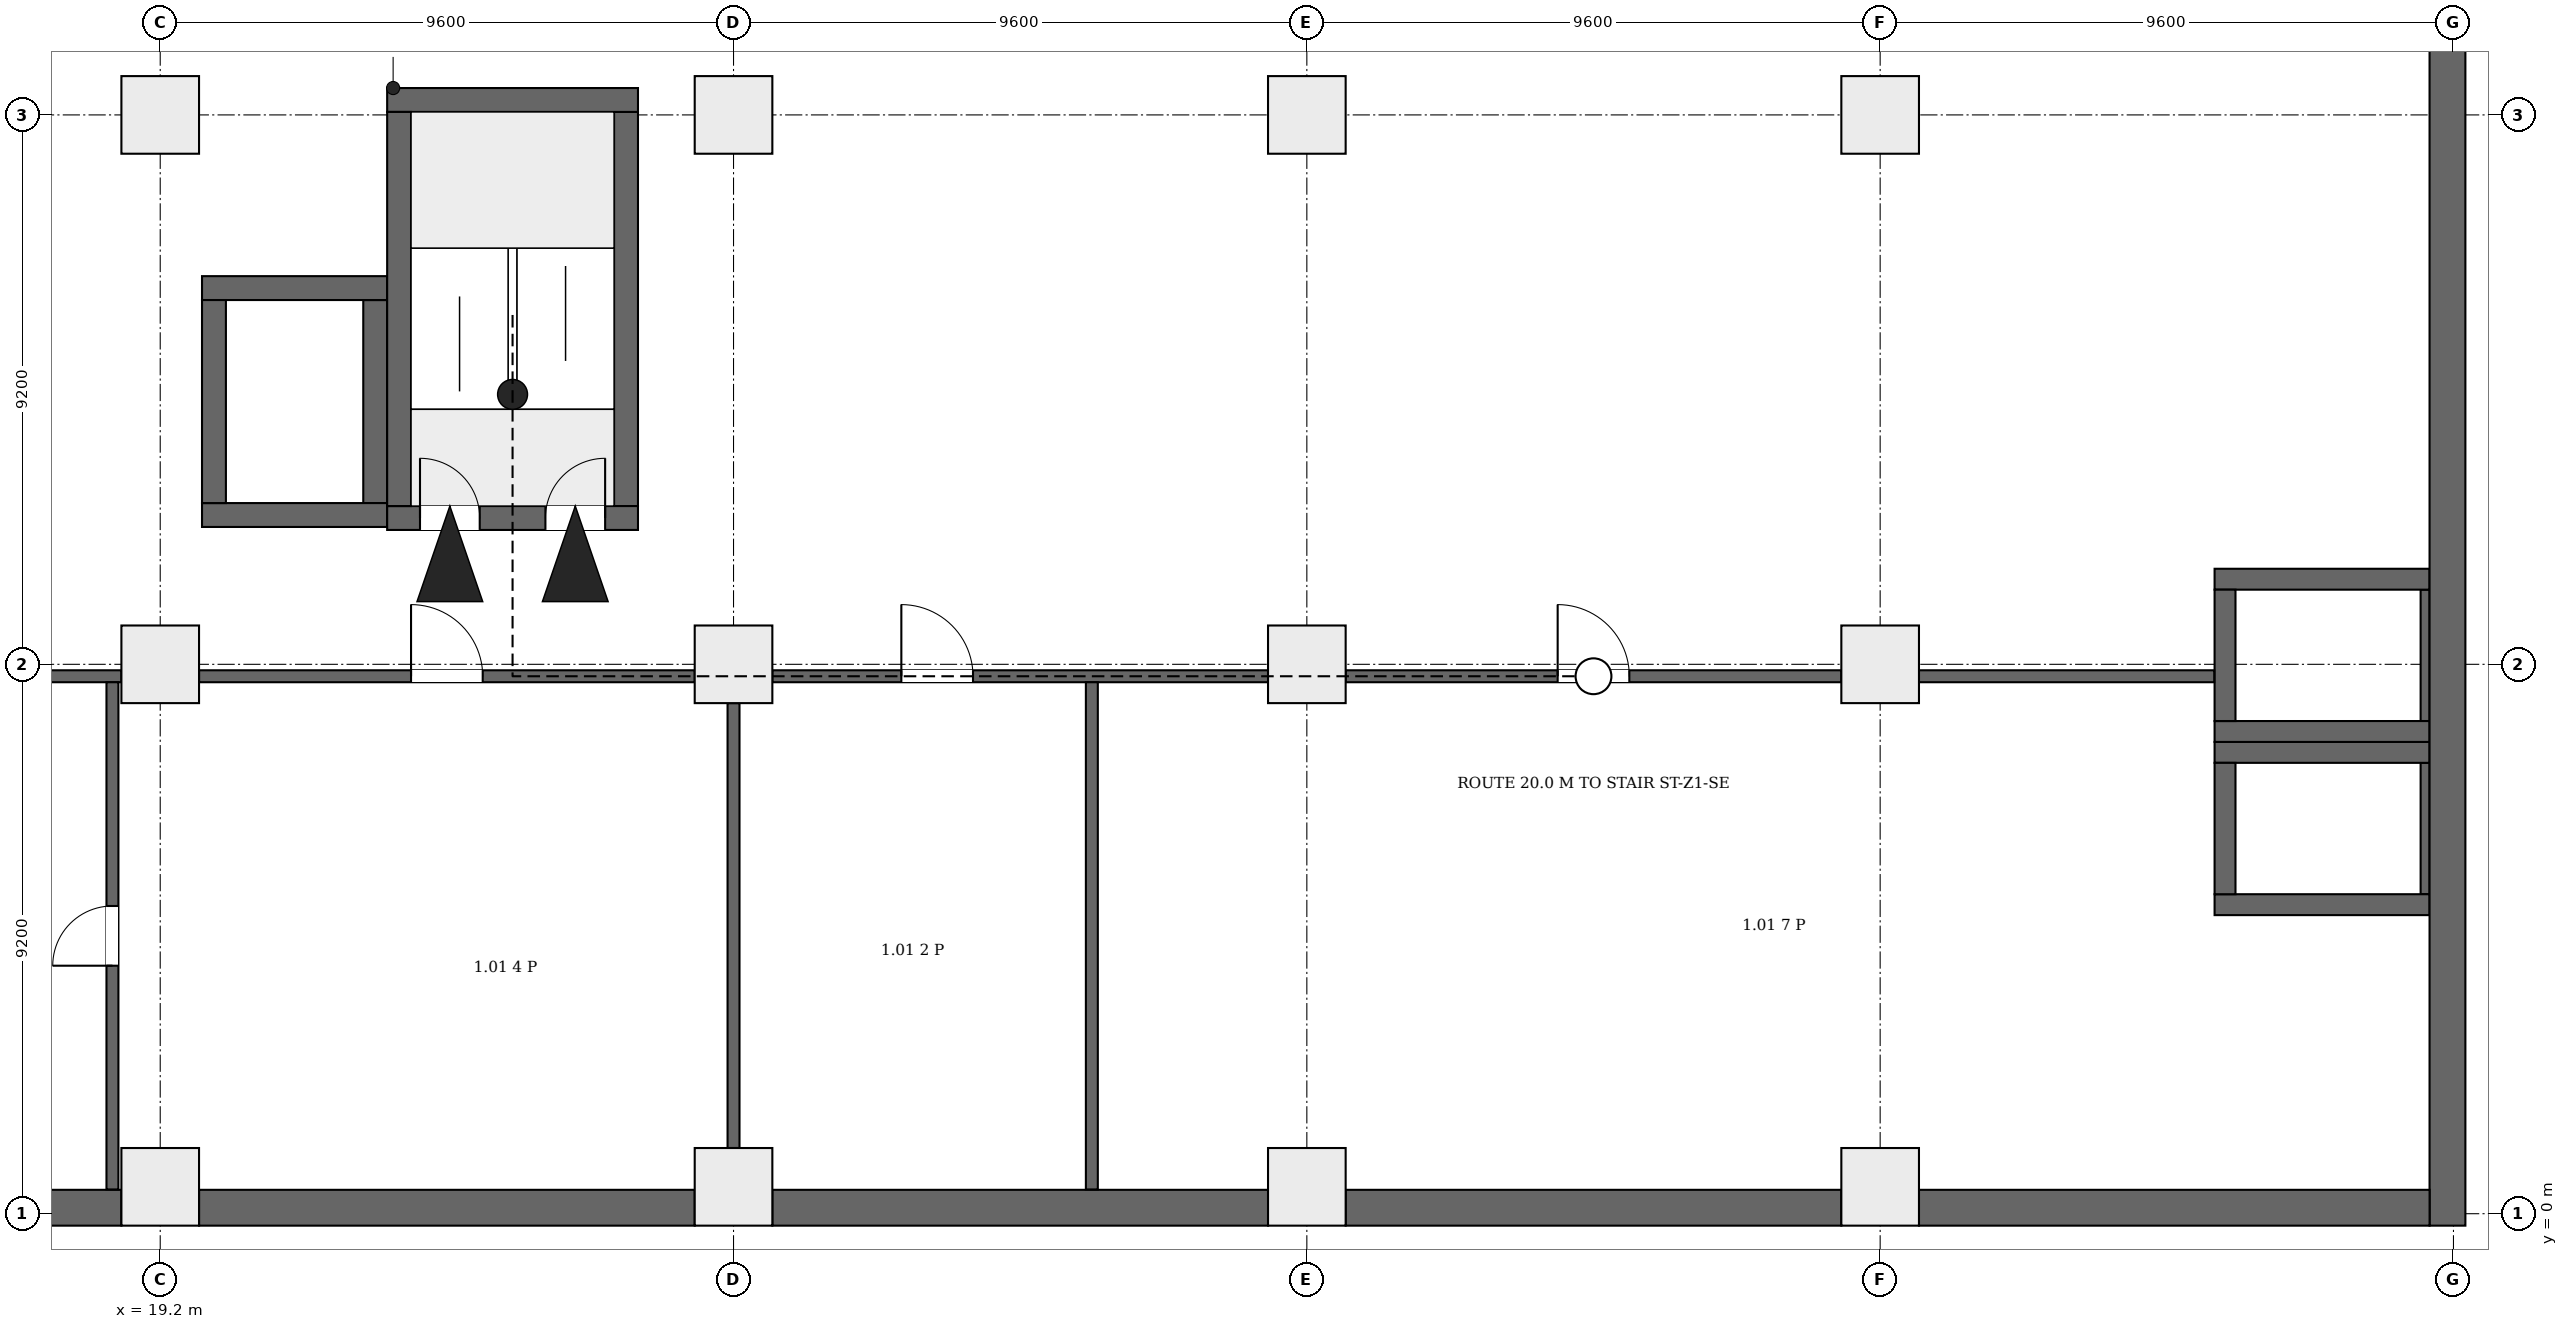
"""IFC4 building model, lengths in metres.
Left out: names, types, materials, properties, quantities, classifications, styles, units other than length and angle.
Written with IfcOpenShell. Run it as: python <this file> out.ifc"""

import sys

from ifc_helpers import new_model, si_unit, direction, frame, frame_2d, origin, origin_2d, place, context, subcontext, project, spatial, rectangle, extrude, element, fill, save


model = new_model("IFC4")
c1 = context("Model", 3, precision=1e-05, world=origin(), true_north=direction((0.0, 1.0)))
c2 = subcontext(c1, "Body", "Model", "MODEL_VIEW")
j1 = project(units=[si_unit("LENGTHUNIT", "METRE"), si_unit("PLANEANGLEUNIT", "RADIAN")], contexts=[c1])
p1 = place(None, origin())
s1 = spatial("IfcSite", under=j1, at=p1, CompositionType="ELEMENT")
p2 = place(p1, origin())
s2 = spatial("IfcBuilding", under=s1, at=p2, CompositionType="ELEMENT")
p3 = place(p2, frame((0.0, 0.0, -5.5)))
s3 = spatial("IfcBuildingStorey", under=s2, at=p3, CompositionType="ELEMENT", Elevation=-5.5)
p4 = place(p3, frame((57.5, -0.2, 0.0), z_axis=(0.0, 0.0, 1.0), x_axis=(0.0, 1.0, 0.0)))
e1 = element("IfcWall", 1, at=p4, inside=s3, PredefinedType="SOLIDWALL", context=c2, shape_type="SweptSolid", body=[
    extrude(rectangle(XDim=46.88, YDim=0.6, at=frame_2d((23.44, 0.0))), origin(), (0.0, 0.0, 1.0), 5.5),
])
p5 = place(p3, frame((10.25, 0.1, 0.0), z_axis=(0.0, 0.0, 1.0), x_axis=(1.0, 0.0, 0.0)))
e2 = element("IfcWall", 2, at=p5, inside=s3, PredefinedType="SOLIDWALL", context=c2, shape_type="SweptSolid", body=[
    extrude(rectangle(XDim=8.3, YDim=0.6, at=frame_2d((4.15, 0.0))), origin(), (0.0, 0.0, 1.0), 5.5),
])
p6 = place(p3, frame((19.85, 0.1, 0.0), z_axis=(0.0, 0.0, 1.0), x_axis=(1.0, 0.0, 0.0)))
e3 = element("IfcWall", 3, at=p6, inside=s3, PredefinedType="SOLIDWALL", context=c2, shape_type="SweptSolid", body=[
    extrude(rectangle(XDim=8.3, YDim=0.6, at=frame_2d((4.15, 0.0))), origin(), (0.0, 0.0, 1.0), 5.5),
])
for number, where, z_axis, x_axis in (
    (4, (29.45, 0.1, 0.0), (0.0, 0.0, 1.0), (1.0, 0.0, 0.0)),
    (5, (39.05, 0.1, 0.0), (0.0, 0.0, 1.0), (1.0, 0.0, 0.0)),
):
    element("IfcWall", number, at=place(p3, frame(where, z_axis=z_axis, x_axis=x_axis)), inside=s3, PredefinedType="SOLIDWALL", context=c2, shape_type="SweptSolid", body=[
        extrude(rectangle(XDim=8.3, YDim=0.6, at=frame_2d((4.15, 0.0))), origin(), (0.0, 0.0, 1.0), 5.5),
    ])
p7 = place(p3, frame((48.65, 0.1, 0.0), z_axis=(0.0, 0.0, 1.0), x_axis=(1.0, 0.0, 0.0)))
e6 = element("IfcWall", 6, at=p7, inside=s3, PredefinedType="SOLIDWALL", context=c2, shape_type="SweptSolid", body=[
    extrude(rectangle(XDim=8.55, YDim=0.6, at=frame_2d((4.275, 0.0))), origin(), (0.0, 0.0, 1.0), 5.5),
])
p8 = place(p3, frame((23.0, 11.65, 0.0), z_axis=(0.0, 0.0, 1.0), x_axis=(1.0, 0.0, 0.0)))
e7 = element("IfcWall", 7, at=p8, inside=s3, PredefinedType="SHEAR", context=c2, shape_type="SweptSolid", body=[
    extrude(rectangle(XDim=4.2, YDim=0.4, at=frame_2d((2.1, 0.0))), origin(), (0.0, 0.0, 1.0), 5.5),
])
p9 = place(p8, frame((0.55, 0.0, 0.0)))
e8 = element("IfcOpeningElement", 8, at=p9, cuts=e7, PredefinedType="OPENING", context=c2, shape_type="SweptSolid", body=[
    extrude(rectangle(XDim=1.0, YDim=2.1, at=frame_2d((0.5, 1.05))), frame((0.0, 0.21, 0.0), z_axis=(0.0, -1.0, 0.0), x_axis=(1.0, 0.0, 0.0)), (0.0, 0.0, 1.0), 0.42),
])
p10 = place(p8, frame((2.65, 0.0, 0.0)))
e9 = element("IfcOpeningElement", 9, at=p10, cuts=e7, PredefinedType="OPENING", context=c2, shape_type="SweptSolid", body=[
    extrude(rectangle(XDim=1.0, YDim=2.1, at=frame_2d((0.5, 1.05))), frame((0.0, 0.21, 0.0), z_axis=(0.0, -1.0, 0.0), x_axis=(1.0, 0.0, 0.0)), (0.0, 0.0, 1.0), 0.42),
])
p11 = place(p3, frame((23.0, 18.65, 0.0), z_axis=(0.0, 0.0, 1.0), x_axis=(1.0, 0.0, 0.0)))
e10 = element("IfcWall", 10, at=p11, inside=s3, PredefinedType="SHEAR", context=c2, shape_type="SweptSolid", body=[
    extrude(rectangle(XDim=4.2, YDim=0.4, at=frame_2d((2.1, 0.0))), origin(), (0.0, 0.0, 1.0), 5.5),
])
for number, where, z_axis, x_axis in (
    (11, (23.2, 11.85, 0.0), (0.0, 0.0, 1.0), (0.0, 1.0, 0.0)),
    (12, (27.0, 11.85, 0.0), (0.0, 0.0, 1.0), (0.0, 1.0, 0.0)),
):
    element("IfcWall", number, at=place(p3, frame(where, z_axis=z_axis, x_axis=x_axis)), inside=s3, PredefinedType="SHEAR", context=c2, shape_type="SweptSolid", body=[
        extrude(rectangle(XDim=6.6, YDim=0.4, at=frame_2d((3.3, 0.0))), origin(), (0.0, 0.0, 1.0), 5.5),
    ])
for number, where, z_axis, x_axis in (
    (13, (53.6, 5.175, 0.0), (0.0, 0.0, 1.0), (1.0, 0.0, 0.0)),
    (14, (53.6, 7.725, 0.0), (0.0, 0.0, 1.0), (1.0, 0.0, 0.0)),
):
    element("IfcWall", number, at=place(p3, frame(where, z_axis=z_axis, x_axis=x_axis)), inside=s3, PredefinedType="SHEAR", context=c2, shape_type="SweptSolid", body=[
        extrude(rectangle(XDim=3.6, YDim=0.35, at=frame_2d((1.8, 0.0))), origin(), (0.0, 0.0, 1.0), 5.5),
    ])
p12 = place(p3, frame((53.775, 5.35, 0.0), z_axis=(0.0, 0.0, 1.0), x_axis=(0.0, 1.0, 0.0)))
e15 = element("IfcWall", 15, at=p12, inside=s3, PredefinedType="SHEAR", context=c2, shape_type="SweptSolid", body=[
    extrude(rectangle(XDim=2.2, YDim=0.35, at=frame_2d((1.1, 0.0))), origin(), (0.0, 0.0, 1.0), 5.5),
])
p13 = place(p3, frame((57.125, 5.35, 0.0), z_axis=(0.0, 0.0, 1.0), x_axis=(0.0, 1.0, 0.0)))
e16 = element("IfcWall", 16, at=p13, inside=s3, PredefinedType="SHEAR", context=c2, shape_type="SweptSolid", body=[
    extrude(rectangle(XDim=2.2, YDim=0.15, at=frame_2d((1.1, 0.0))), origin(), (0.0, 0.0, 1.0), 5.5),
])
for number, where, z_axis, x_axis in (
    (17, (53.6, 8.075, 0.0), (0.0, 0.0, 1.0), (1.0, 0.0, 0.0)),
    (18, (53.6, 10.625, 0.0), (0.0, 0.0, 1.0), (1.0, 0.0, 0.0)),
):
    element("IfcWall", number, at=place(p3, frame(where, z_axis=z_axis, x_axis=x_axis)), inside=s3, PredefinedType="SHEAR", context=c2, shape_type="SweptSolid", body=[
        extrude(rectangle(XDim=3.6, YDim=0.35, at=frame_2d((1.8, 0.0))), origin(), (0.0, 0.0, 1.0), 5.5),
    ])
p14 = place(p3, frame((53.775, 8.25, 0.0), z_axis=(0.0, 0.0, 1.0), x_axis=(0.0, 1.0, 0.0)))
e19 = element("IfcWall", 19, at=p14, inside=s3, PredefinedType="SHEAR", context=c2, shape_type="SweptSolid", body=[
    extrude(rectangle(XDim=2.2, YDim=0.35, at=frame_2d((1.1, 0.0))), origin(), (0.0, 0.0, 1.0), 5.5),
])
p15 = place(p3, frame((57.125, 8.25, 0.0), z_axis=(0.0, 0.0, 1.0), x_axis=(0.0, 1.0, 0.0)))
e20 = element("IfcWall", 20, at=p15, inside=s3, PredefinedType="SHEAR", context=c2, shape_type="SweptSolid", body=[
    extrude(rectangle(XDim=2.2, YDim=0.15, at=frame_2d((1.1, 0.0))), origin(), (0.0, 0.0, 1.0), 5.5),
])
for number, where, z_axis, x_axis in (
    (21, (19.9, 11.7, 0.0), (0.0, 0.0, 1.0), (1.0, 0.0, 0.0)),
    (22, (19.9, 15.5, 0.0), (0.0, 0.0, 1.0), (1.0, 0.0, 0.0)),
):
    element("IfcWall", number, at=place(p3, frame(where, z_axis=z_axis, x_axis=x_axis)), inside=s3, PredefinedType="SHEAR", context=c2, shape_type="SweptSolid", body=[
        extrude(rectangle(XDim=3.1, YDim=0.4, at=frame_2d((1.55, 0.0))), origin(), (0.0, 0.0, 1.0), 5.5),
    ])
for number, where, z_axis, x_axis in (
    (23, (20.1, 11.9, 0.0), (0.0, 0.0, 1.0), (0.0, 1.0, 0.0)),
    (24, (22.8, 11.9, 0.0), (0.0, 0.0, 1.0), (0.0, 1.0, 0.0)),
):
    element("IfcWall", number, at=place(p3, frame(where, z_axis=z_axis, x_axis=x_axis)), inside=s3, PredefinedType="SHEAR", context=c2, shape_type="SweptSolid", body=[
        extrude(rectangle(XDim=3.4, YDim=0.4, at=frame_2d((1.7, 0.0))), origin(), (0.0, 0.0, 1.0), 5.5),
    ])
for number, where, z_axis, x_axis in (
    (25, (19.2, 0.45, 0.0), (0.0, 0.0, 1.0), (1.0, 0.0, 0.0)),
    (26, (28.8, 0.45, 0.0), (0.0, 0.0, 1.0), (1.0, 0.0, 0.0)),
    (27, (38.4, 0.45, 0.0), (0.0, 0.0, 1.0), (1.0, 0.0, 0.0)),
    (28, (48.0, 0.45, 0.0), (0.0, 0.0, 1.0), (1.0, 0.0, 0.0)),
    (29, (19.2, 9.2, 0.0), (0.0, 0.0, 1.0), (1.0, 0.0, 0.0)),
    (30, (28.8, 9.2, 0.0), (0.0, 0.0, 1.0), (1.0, 0.0, 0.0)),
    (31, (38.4, 9.2, 0.0), (0.0, 0.0, 1.0), (1.0, 0.0, 0.0)),
    (32, (48.0, 9.2, 0.0), (0.0, 0.0, 1.0), (1.0, 0.0, 0.0)),
    (33, (19.2, 18.4, 0.0), (0.0, 0.0, 1.0), (1.0, 0.0, 0.0)),
    (34, (28.8, 18.4, 0.0), (0.0, 0.0, 1.0), (1.0, 0.0, 0.0)),
    (35, (38.4, 18.4, 0.0), (0.0, 0.0, 1.0), (1.0, 0.0, 0.0)),
    (36, (48.0, 18.4, 0.0), (0.0, 0.0, 1.0), (1.0, 0.0, 0.0)),
):
    element("IfcColumn", number, at=place(p3, frame(where, z_axis=z_axis, x_axis=x_axis)), inside=s3, PredefinedType="COLUMN", context=c2, shape_type="SweptSolid", body=[
        extrude(rectangle(XDim=1.3, YDim=1.3, at=origin_2d()), origin(), (0.0, 0.0, 1.0), 5.5),
    ])
p16 = place(p3, frame((10.25, 9.0, 0.0), z_axis=(0.0, 0.0, 1.0), x_axis=(1.0, 0.0, 0.0)))
e37 = element("IfcWall", 37, at=p16, inside=s3, PredefinedType="PARTITIONING", context=c2, shape_type="SweptSolid", body=[
    extrude(rectangle(XDim=8.3, YDim=0.2, at=frame_2d((4.15, 0.0))), origin(), (0.0, 0.0, 1.0), 5.15),
])
p17 = place(p3, frame((18.4, 0.406, 0.0), z_axis=(0.0, 0.0, 1.0), x_axis=(0.0, 1.0, 0.0)))
e38 = element("IfcWall", 38, at=p17, inside=s3, PredefinedType="PARTITIONING", context=c2, shape_type="SweptSolid", body=[
    extrude(rectangle(XDim=8.494, YDim=0.2, at=frame_2d((4.247, 0.0))), origin(), (0.0, 0.0, 1.0), 5.15),
])
p18 = place(p17, frame((3.747, 0.0, 0.0)))
e39 = element("IfcOpeningElement", 39, at=p18, cuts=e38, PredefinedType="OPENING", context=c2, shape_type="SweptSolid", body=[
    extrude(rectangle(XDim=1.0, YDim=2.1, at=frame_2d((0.5, 1.05))), frame((0.0, 0.11, 0.0), z_axis=(0.0, -1.0, 0.0), x_axis=(1.0, 0.0, 0.0)), (0.0, 0.0, 1.0), 0.22),
])
p19 = place(p3, frame((19.85, 9.0, 0.0), z_axis=(0.0, 0.0, 1.0), x_axis=(1.0, 0.0, 0.0)))
e40 = element("IfcWall", 40, at=p19, inside=s3, PredefinedType="PARTITIONING", context=c2, shape_type="SweptSolid", body=[
    extrude(rectangle(XDim=8.3, YDim=0.2, at=frame_2d((4.15, 0.0))), origin(), (0.0, 0.0, 1.0), 5.15),
])
p20 = place(p19, frame((3.55, 0.0, 0.0)))
e41 = element("IfcOpeningElement", 41, at=p20, cuts=e40, PredefinedType="OPENING", context=c2, shape_type="SweptSolid", body=[
    extrude(rectangle(XDim=1.2, YDim=2.1, at=frame_2d((0.6, 1.05))), frame((0.0, 0.11, 0.0), z_axis=(0.0, -1.0, 0.0), x_axis=(1.0, 0.0, 0.0)), (0.0, 0.0, 1.0), 0.22),
])
p21 = place(p3, frame((28.8, 1.1, 0.0), z_axis=(0.0, 0.0, 1.0), x_axis=(0.0, 1.0, 0.0)))
e42 = element("IfcWall", 42, at=p21, inside=s3, PredefinedType="PARTITIONING", context=c2, shape_type="SweptSolid", body=[
    extrude(rectangle(XDim=7.45, YDim=0.2, at=frame_2d((3.725, 0.0))), origin(), (0.0, 0.0, 1.0), 5.15),
])
p22 = place(p3, frame((29.45, 9.0, 0.0), z_axis=(0.0, 0.0, 1.0), x_axis=(1.0, 0.0, 0.0)))
e43 = element("IfcWall", 43, at=p22, inside=s3, PredefinedType="PARTITIONING", context=c2, shape_type="SweptSolid", body=[
    extrude(rectangle(XDim=8.3, YDim=0.2, at=frame_2d((4.15, 0.0))), origin(), (0.0, 0.0, 1.0), 5.15),
])
p23 = place(p22, frame((2.16, 0.0, 0.0)))
e44 = element("IfcOpeningElement", 44, at=p23, cuts=e43, PredefinedType="OPENING", context=c2, shape_type="SweptSolid", body=[
    extrude(rectangle(XDim=1.2, YDim=2.1, at=frame_2d((0.6, 1.05))), frame((0.0, 0.11, 0.0), z_axis=(0.0, -1.0, 0.0), x_axis=(1.0, 0.0, 0.0)), (0.0, 0.0, 1.0), 0.22),
])
p24 = place(p3, frame((34.8, 0.406, 0.0), z_axis=(0.0, 0.0, 1.0), x_axis=(0.0, 1.0, 0.0)))
e45 = element("IfcWall", 45, at=p24, inside=s3, PredefinedType="PARTITIONING", context=c2, shape_type="SweptSolid", body=[
    extrude(rectangle(XDim=8.494, YDim=0.2, at=frame_2d((4.247, 0.0))), origin(), (0.0, 0.0, 1.0), 5.15),
])
p25 = place(p3, frame((39.05, 9.0, 0.0), z_axis=(0.0, 0.0, 1.0), x_axis=(1.0, 0.0, 0.0)))
e46 = element("IfcWall", 46, at=p25, inside=s3, PredefinedType="PARTITIONING", context=c2, shape_type="SweptSolid", body=[
    extrude(rectangle(XDim=8.3, YDim=0.2, at=frame_2d((4.15, 0.0))), origin(), (0.0, 0.0, 1.0), 5.15),
])
p26 = place(p25, frame((3.55, 0.0, 0.0)))
e47 = element("IfcOpeningElement", 47, at=p26, cuts=e46, PredefinedType="OPENING", context=c2, shape_type="SweptSolid", body=[
    extrude(rectangle(XDim=1.2, YDim=2.1, at=frame_2d((0.6, 1.05))), frame((0.0, 0.11, 0.0), z_axis=(0.0, -1.0, 0.0), x_axis=(1.0, 0.0, 0.0)), (0.0, 0.0, 1.0), 0.22),
])
p27 = place(p3, frame((48.65, 9.0, 0.0), z_axis=(0.0, 0.0, 1.0), x_axis=(1.0, 0.0, 0.0)))
e48 = element("IfcWall", 48, at=p27, inside=s3, PredefinedType="PARTITIONING", context=c2, shape_type="SweptSolid", body=[
    extrude(rectangle(XDim=4.944, YDim=0.2, at=frame_2d((2.472, 0.0))), origin(), (0.0, 0.0, 1.0), 5.15),
])
p28 = place(p9, origin())
e49 = element("IfcDoor", 49, at=p28, inside=s3, OperationType="SINGLE_SWING_RIGHT", PredefinedType="DOOR", context=c2, shape_type="SweptSolid", body=[
    extrude(rectangle(XDim=1.0, YDim=2.1, at=frame_2d((0.5, 1.05))), frame((0.0, 0.025, 0.0), z_axis=(0.0, -1.0, 0.0), x_axis=(1.0, 0.0, 0.0)), (0.0, 0.0, 1.0), 0.05),
])
fill(e8, e49)
p29 = place(p10, origin())
e50 = element("IfcDoor", 50, at=p29, inside=s3, OperationType="SINGLE_SWING_LEFT", PredefinedType="DOOR", context=c2, shape_type="SweptSolid", body=[
    extrude(rectangle(XDim=1.0, YDim=2.1, at=frame_2d((0.5, 1.05))), frame((0.0, 0.025, 0.0), z_axis=(0.0, -1.0, 0.0), x_axis=(1.0, 0.0, 0.0)), (0.0, 0.0, 1.0), 0.05),
])
fill(e9, e50)
p30 = place(p20, origin())
e51 = element("IfcDoor", 51, at=p30, inside=s3, OperationType="SINGLE_SWING_LEFT", PredefinedType="DOOR", context=c2, shape_type="SweptSolid", body=[
    extrude(rectangle(XDim=1.2, YDim=2.1, at=frame_2d((0.6, 1.05))), frame((0.0, 0.025, 0.0), z_axis=(0.0, -1.0, 0.0), x_axis=(1.0, 0.0, 0.0)), (0.0, 0.0, 1.0), 0.05),
])
fill(e41, e51)
p31 = place(p23, origin())
e52 = element("IfcDoor", 52, at=p31, inside=s3, OperationType="SINGLE_SWING_RIGHT", PredefinedType="DOOR", context=c2, shape_type="SweptSolid", body=[
    extrude(rectangle(XDim=1.2, YDim=2.1, at=frame_2d((0.6, 1.05))), frame((0.0, 0.025, 0.0), z_axis=(0.0, -1.0, 0.0), x_axis=(1.0, 0.0, 0.0)), (0.0, 0.0, 1.0), 0.05),
])
fill(e44, e52)
p32 = place(p26, origin())
e53 = element("IfcDoor", 53, at=p32, inside=s3, OperationType="SINGLE_SWING_RIGHT", PredefinedType="DOOR", context=c2, shape_type="SweptSolid", body=[
    extrude(rectangle(XDim=1.2, YDim=2.1, at=frame_2d((0.6, 1.05))), frame((0.0, 0.025, 0.0), z_axis=(0.0, -1.0, 0.0), x_axis=(1.0, 0.0, 0.0)), (0.0, 0.0, 1.0), 0.05),
])
fill(e47, e53)
p33 = place(p18, origin())
e54 = element("IfcDoor", 54, at=p33, inside=s3, OperationType="SINGLE_SWING_LEFT", PredefinedType="DOOR", context=c2, shape_type="SweptSolid", body=[
    extrude(rectangle(XDim=1.0, YDim=2.1, at=frame_2d((0.5, 1.05))), frame((0.0, 0.025, 0.0), z_axis=(0.0, -1.0, 0.0), x_axis=(1.0, 0.0, 0.0)), (0.0, 0.0, 1.0), 0.05),
])
fill(e39, e54)
save(model, sys.argv[1])
